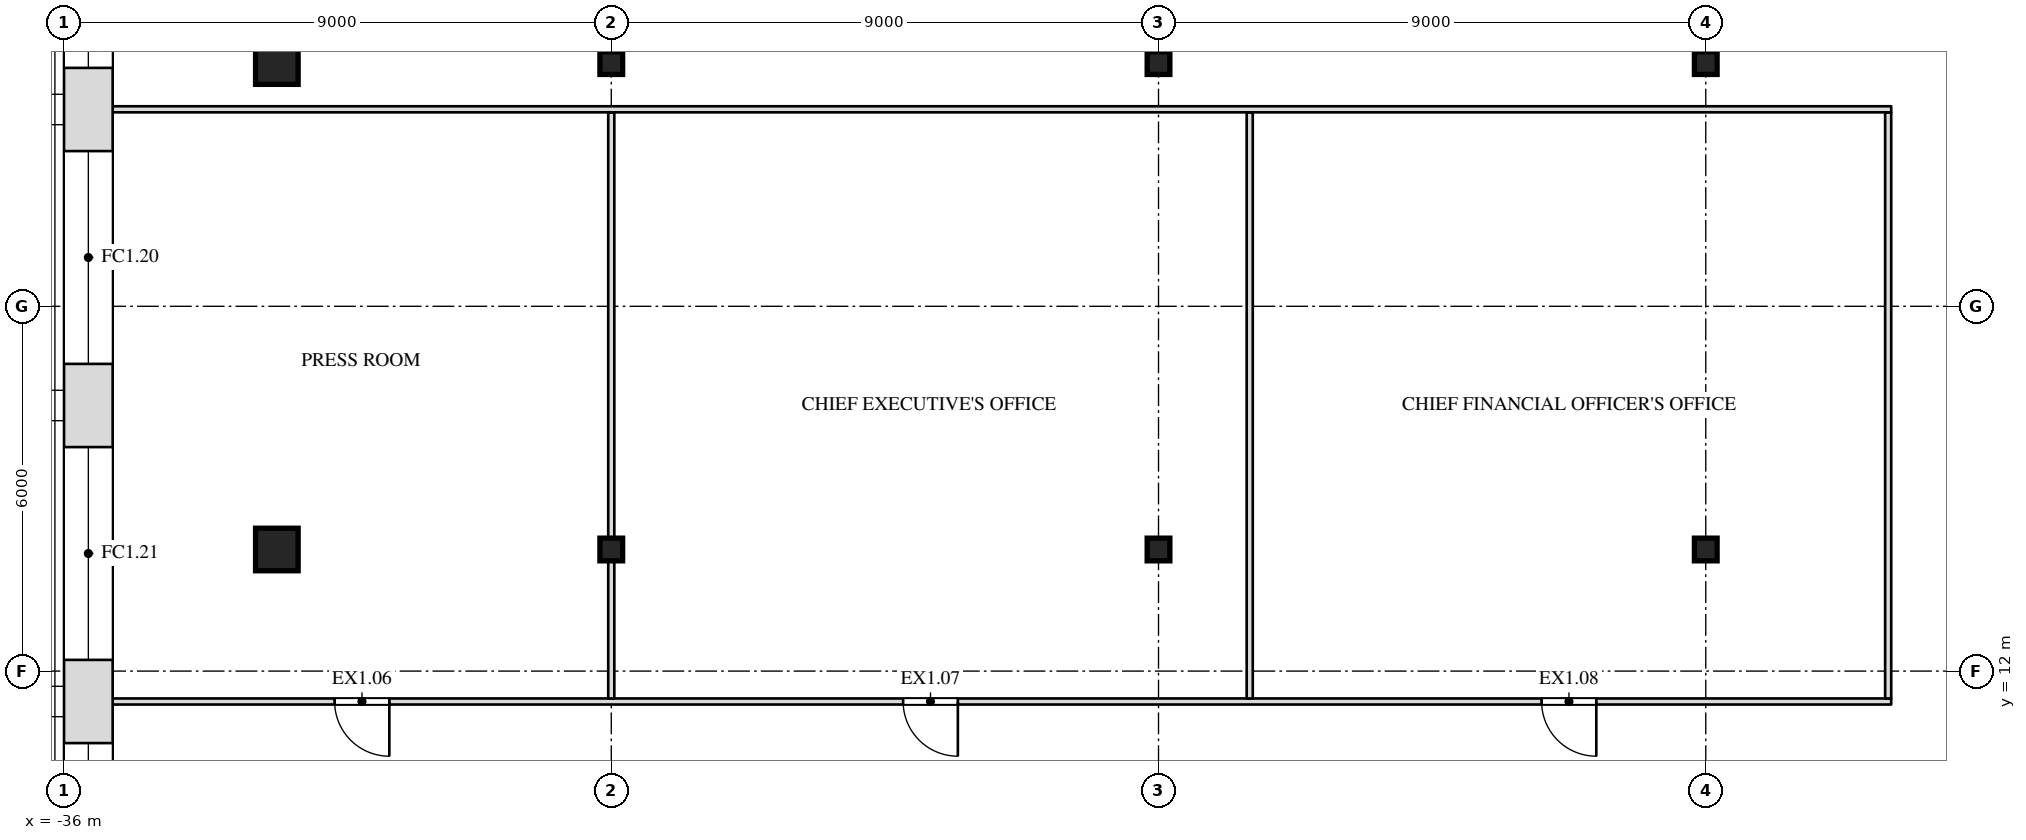
"""IFC4 building model, lengths in metres.
Left out: names, types, materials, properties, quantities, classifications, styles, units other than length and angle.
Written with IfcOpenShell. Run it as: python <this file> out.ifc"""

import sys

from ifc_helpers import new_model, si_unit, direction, frame, frame_2d, origin, origin_2d, place, context, subcontext, project, spatial, rectangle, i_section, extrude, element, fill, save


model = new_model("IFC4")
c1 = context("Model", 3, precision=1e-05, world=origin(), true_north=direction((0.0, 1.0)))
c2 = subcontext(c1, "Body", "Model", "MODEL_VIEW")
j1 = project(units=[si_unit("LENGTHUNIT", "METRE"), si_unit("PLANEANGLEUNIT", "RADIAN")], contexts=[c1])
p1 = place(None, origin())
s1 = spatial("IfcSite", under=j1, at=p1, CompositionType="ELEMENT")
p2 = place(p1, origin())
s2 = spatial("IfcBuilding", under=s1, at=p2, CompositionType="ELEMENT")
p3 = place(p2, frame((0.0, 0.0, 272.5)))
s3 = spatial("IfcBuildingStorey", under=s2, at=p3, CompositionType="ELEMENT", Elevation=272.5)
p4 = place(p3, frame((-32.5, 14.0, 0.0), z_axis=(0.0, 0.0, 1.0), x_axis=(1.0, 0.0, 0.0)))
e1 = element("IfcColumn", 1, at=p4, inside=s3, PredefinedType="COLUMN", context=c2, shape_type="SweptSolid", body=[
    extrude(rectangle(XDim=0.7, YDim=0.7, at=origin_2d()), origin(), (0.0, 0.0, 1.0), 4.0),
])
for number, where, z_axis, x_axis in (
    (2, (-27.0, 14.0, 0.0), (0.0, 0.0, 1.0), (1.0, 0.0, 0.0)),
    (3, (-18.0, 14.0, 0.0), (0.0, 0.0, 1.0), (1.0, 0.0, 0.0)),
    (4, (-9.0, 14.0, 0.0), (0.0, 0.0, 1.0), (1.0, 0.0, 0.0)),
):
    element("IfcColumn", number, at=place(p3, frame(where, z_axis=z_axis, x_axis=x_axis)), inside=s3, PredefinedType="COLUMN", context=c2, shape_type="SweptSolid", body=[
        extrude(i_section(OverallWidth=0.373, OverallDepth=0.373, WebThickness=0.016, FlangeThickness=0.026, at=origin_2d()), origin(), (0.0, 0.0, 1.0), 4.0),
    ])
p5 = place(p3, frame((-32.5, 22.0, 0.0), z_axis=(0.0, 0.0, 1.0), x_axis=(1.0, 0.0, 0.0)))
e5 = element("IfcColumn", 5, at=p5, inside=s3, PredefinedType="COLUMN", context=c2, shape_type="SweptSolid", body=[
    extrude(rectangle(XDim=0.7, YDim=0.7, at=origin_2d()), origin(), (0.0, 0.0, 1.0), 4.0),
])
for number, where, z_axis, x_axis in (
    (6, (-27.0, 22.0, 0.0), (0.0, 0.0, 1.0), (1.0, 0.0, 0.0)),
    (7, (-18.0, 22.0, 0.0), (0.0, 0.0, 1.0), (1.0, 0.0, 0.0)),
    (8, (-9.0, 22.0, 0.0), (0.0, 0.0, 1.0), (1.0, 0.0, 0.0)),
):
    element("IfcColumn", number, at=place(p3, frame(where, z_axis=z_axis, x_axis=x_axis)), inside=s3, PredefinedType="COLUMN", context=c2, shape_type="SweptSolid", body=[
        extrude(i_section(OverallWidth=0.373, OverallDepth=0.373, WebThickness=0.016, FlangeThickness=0.026, at=origin_2d()), origin(), (0.0, 0.0, 1.0), 4.0),
    ])
p6 = place(p3, frame((-35.2, 11.5, 0.0), z_axis=(0.0, 0.0, 1.0), x_axis=(1.0, 0.0, 0.0)))
e9 = element("IfcWall", 9, at=p6, inside=s3, PredefinedType="PARTITIONING", context=c2, shape_type="SweptSolid", body=[
    extrude(rectangle(XDim=29.25, YDim=0.1, at=frame_2d((14.625, 0.0))), origin(), (0.0, 0.0, 1.0), 3.78),
])
p7 = place(p6, frame((3.65, 0.0, 0.0)))
e10 = element("IfcOpeningElement", 10, at=p7, cuts=e9, PredefinedType="OPENING", context=c2, shape_type="SweptSolid", body=[
    extrude(rectangle(XDim=0.9, YDim=2.1, at=frame_2d((0.45, 1.05))), frame((0.0, 0.062, 0.0), z_axis=(0.0, -1.0, 0.0), x_axis=(1.0, 0.0, 0.0)), (0.0, 0.0, 1.0), 0.124),
])
p8 = place(p6, frame((13.0, 0.0, 0.0)))
e11 = element("IfcOpeningElement", 11, at=p8, cuts=e9, PredefinedType="OPENING", context=c2, shape_type="SweptSolid", body=[
    extrude(rectangle(XDim=0.9, YDim=2.1, at=frame_2d((0.45, 1.05))), frame((0.0, 0.062, 0.0), z_axis=(0.0, -1.0, 0.0), x_axis=(1.0, 0.0, 0.0)), (0.0, 0.0, 1.0), 0.124),
])
p9 = place(p6, frame((23.5, 0.0, 0.0)))
e12 = element("IfcOpeningElement", 12, at=p9, cuts=e9, PredefinedType="OPENING", context=c2, shape_type="SweptSolid", body=[
    extrude(rectangle(XDim=0.9, YDim=2.1, at=frame_2d((0.45, 1.05))), frame((0.0, 0.062, 0.0), z_axis=(0.0, -1.0, 0.0), x_axis=(1.0, 0.0, 0.0)), (0.0, 0.0, 1.0), 0.124),
])
p10 = place(p3, frame((-27.0, 11.55, 0.0), z_axis=(0.0, 0.0, 1.0), x_axis=(0.0, 1.0, 0.0)))
e13 = element("IfcWall", 13, at=p10, inside=s3, PredefinedType="PARTITIONING", context=c2, shape_type="SweptSolid", body=[
    extrude(rectangle(XDim=2.263, YDim=0.1, at=frame_2d((1.132, 0.0))), origin(), (0.0, 0.0, 1.0), 3.247),
])
p11 = place(p3, frame((-27.0, 14.187, 0.0), z_axis=(0.0, 0.0, 1.0), x_axis=(0.0, 1.0, 0.0)))
e14 = element("IfcWall", 14, at=p11, inside=s3, PredefinedType="PARTITIONING", context=c2, shape_type="SweptSolid", body=[
    extrude(rectangle(XDim=7.003, YDim=0.1, at=frame_2d((3.501, 0.0))), origin(), (0.0, 0.0, 1.0), 3.247),
])
for number, where, z_axis, x_axis in (
    (15, (-16.5, 11.55, 0.0), (0.0, 0.0, 1.0), (0.0, 1.0, 0.0)),
    (16, (-6.0, 11.55, 0.0), (0.0, 0.0, 1.0), (0.0, 1.0, 0.0)),
):
    element("IfcWall", number, at=place(p3, frame(where, z_axis=z_axis, x_axis=x_axis)), inside=s3, PredefinedType="PARTITIONING", context=c2, shape_type="SweptSolid", body=[
        extrude(rectangle(XDim=9.64, YDim=0.1, at=frame_2d((4.82, 0.0))), origin(), (0.0, 0.0, 1.0), 3.78),
    ])
p12 = place(p3, frame((-35.2, 21.24, 0.0), z_axis=(0.0, 0.0, 1.0), x_axis=(1.0, 0.0, 0.0)))
e17 = element("IfcWall", 17, at=p12, inside=s3, PredefinedType="PARTITIONING", context=c2, shape_type="SweptSolid", body=[
    extrude(rectangle(XDim=29.25, YDim=0.1, at=frame_2d((14.625, 0.0))), origin(), (0.0, 0.0, 1.0), 3.78),
])
p13 = place(p3, frame((-35.6, 30.948, 0.0), z_axis=(0.0, 0.0, 1.0), x_axis=(0.0, -1.0, 0.0)))
e18 = element("IfcWall", 18, at=p13, inside=s3, PredefinedType="SOLIDWALL", context=c2, shape_type="SweptSolid", body=[
    extrude(rectangle(XDim=38.895, YDim=0.8, at=frame_2d((19.448, 0.0))), origin(), (0.0, 0.0, 1.0), 3.78),
])
p14 = place(p13, frame((5.526, 0.0, 1.0)))
e19 = element("IfcOpeningElement", 19, at=p14, cuts=e18, PredefinedType="OPENING", context=c2, shape_type="SweptSolid", body=[
    extrude(rectangle(XDim=3.5, YDim=2.5, at=frame_2d((1.75, 1.25))), frame((0.0, 0.412, 0.0), z_axis=(0.0, -1.0, 0.0), x_axis=(1.0, 0.0, 0.0)), (0.0, 0.0, 1.0), 0.824),
])
p15 = place(p13, frame((10.395, 0.0, 1.0)))
e20 = element("IfcOpeningElement", 20, at=p15, cuts=e18, PredefinedType="OPENING", context=c2, shape_type="SweptSolid", body=[
    extrude(rectangle(XDim=3.5, YDim=2.5, at=frame_2d((1.75, 1.25))), frame((0.0, 0.412, 0.0), z_axis=(0.0, -1.0, 0.0), x_axis=(1.0, 0.0, 0.0)), (0.0, 0.0, 1.0), 0.824),
])
p16 = place(p13, frame((15.263, 0.0, 1.0)))
e21 = element("IfcOpeningElement", 21, at=p16, cuts=e18, PredefinedType="OPENING", context=c2, shape_type="SweptSolid", body=[
    extrude(rectangle(XDim=3.5, YDim=2.5, at=frame_2d((1.75, 1.25))), frame((0.0, 0.412, 0.0), z_axis=(0.0, -1.0, 0.0), x_axis=(1.0, 0.0, 0.0)), (0.0, 0.0, 1.0), 0.824),
])
p17 = place(p13, frame((20.132, 0.0, 1.0)))
e22 = element("IfcOpeningElement", 22, at=p17, cuts=e18, PredefinedType="OPENING", context=c2, shape_type="SweptSolid", body=[
    extrude(rectangle(XDim=3.5, YDim=2.5, at=frame_2d((1.75, 1.25))), frame((0.0, 0.412, 0.0), z_axis=(0.0, -1.0, 0.0), x_axis=(1.0, 0.0, 0.0)), (0.0, 0.0, 1.0), 0.824),
])
p18 = place(p13, frame((25.0, 0.0, 1.0)))
e23 = element("IfcOpeningElement", 23, at=p18, cuts=e18, PredefinedType="OPENING", context=c2, shape_type="SweptSolid", body=[
    extrude(rectangle(XDim=3.5, YDim=2.5, at=frame_2d((1.75, 1.25))), frame((0.0, 0.412, 0.0), z_axis=(0.0, -1.0, 0.0), x_axis=(1.0, 0.0, 0.0)), (0.0, 0.0, 1.0), 0.824),
])
p19 = place(p13, frame((29.869, 0.0, 1.0)))
e24 = element("IfcOpeningElement", 24, at=p19, cuts=e18, PredefinedType="OPENING", context=c2, shape_type="SweptSolid", body=[
    extrude(rectangle(XDim=3.5, YDim=2.5, at=frame_2d((1.75, 1.25))), frame((0.0, 0.412, 0.0), z_axis=(0.0, -1.0, 0.0), x_axis=(1.0, 0.0, 0.0)), (0.0, 0.0, 1.0), 0.824),
])
p20 = place(p7, origin())
e25 = element("IfcDoor", 25, at=p20, inside=s3, OperationType="SINGLE_SWING_LEFT", PredefinedType="DOOR", context=c2, shape_type="SweptSolid", body=[
    extrude(rectangle(XDim=0.9, YDim=2.1, at=frame_2d((0.45, 1.05))), frame((0.0, 0.025, 0.0), z_axis=(0.0, -1.0, 0.0), x_axis=(1.0, 0.0, 0.0)), (0.0, 0.0, 1.0), 0.05),
])
fill(e10, e25)
p21 = place(p8, origin())
e26 = element("IfcDoor", 26, at=p21, inside=s3, OperationType="SINGLE_SWING_LEFT", PredefinedType="DOOR", context=c2, shape_type="SweptSolid", body=[
    extrude(rectangle(XDim=0.9, YDim=2.1, at=frame_2d((0.45, 1.05))), frame((0.0, 0.025, 0.0), z_axis=(0.0, -1.0, 0.0), x_axis=(1.0, 0.0, 0.0)), (0.0, 0.0, 1.0), 0.05),
])
fill(e11, e26)
p22 = place(p9, origin())
e27 = element("IfcDoor", 27, at=p22, inside=s3, OperationType="SINGLE_SWING_LEFT", PredefinedType="DOOR", context=c2, shape_type="SweptSolid", body=[
    extrude(rectangle(XDim=0.9, YDim=2.1, at=frame_2d((0.45, 1.05))), frame((0.0, 0.025, 0.0), z_axis=(0.0, -1.0, 0.0), x_axis=(1.0, 0.0, 0.0)), (0.0, 0.0, 1.0), 0.05),
])
fill(e12, e27)
p23 = place(p14, origin())
e28 = element("IfcWindow", 28, at=p23, inside=s3, PartitioningType="SINGLE_PANEL", PredefinedType="WINDOW", context=c2, shape_type="SweptSolid", body=[
    extrude(rectangle(XDim=3.5, YDim=2.5, at=frame_2d((1.75, 1.25))), frame((0.0, 0.03, 0.0), z_axis=(0.0, -1.0, 0.0), x_axis=(1.0, 0.0, 0.0)), (0.0, 0.0, 1.0), 0.06),
])
fill(e19, e28)
p24 = place(p15, origin())
e29 = element("IfcWindow", 29, at=p24, inside=s3, PartitioningType="SINGLE_PANEL", PredefinedType="WINDOW", context=c2, shape_type="SweptSolid", body=[
    extrude(rectangle(XDim=3.5, YDim=2.5, at=frame_2d((1.75, 1.25))), frame((0.0, 0.03, 0.0), z_axis=(0.0, -1.0, 0.0), x_axis=(1.0, 0.0, 0.0)), (0.0, 0.0, 1.0), 0.06),
])
fill(e20, e29)
p25 = place(p16, origin())
e30 = element("IfcWindow", 30, at=p25, inside=s3, PartitioningType="SINGLE_PANEL", PredefinedType="WINDOW", context=c2, shape_type="SweptSolid", body=[
    extrude(rectangle(XDim=3.5, YDim=2.5, at=frame_2d((1.75, 1.25))), frame((0.0, 0.03, 0.0), z_axis=(0.0, -1.0, 0.0), x_axis=(1.0, 0.0, 0.0)), (0.0, 0.0, 1.0), 0.06),
])
fill(e21, e30)
p26 = place(p17, origin())
e31 = element("IfcWindow", 31, at=p26, inside=s3, PartitioningType="SINGLE_PANEL", PredefinedType="WINDOW", context=c2, shape_type="SweptSolid", body=[
    extrude(rectangle(XDim=3.5, YDim=2.5, at=frame_2d((1.75, 1.25))), frame((0.0, 0.03, 0.0), z_axis=(0.0, -1.0, 0.0), x_axis=(1.0, 0.0, 0.0)), (0.0, 0.0, 1.0), 0.06),
])
fill(e22, e31)
save(model, sys.argv[1])
